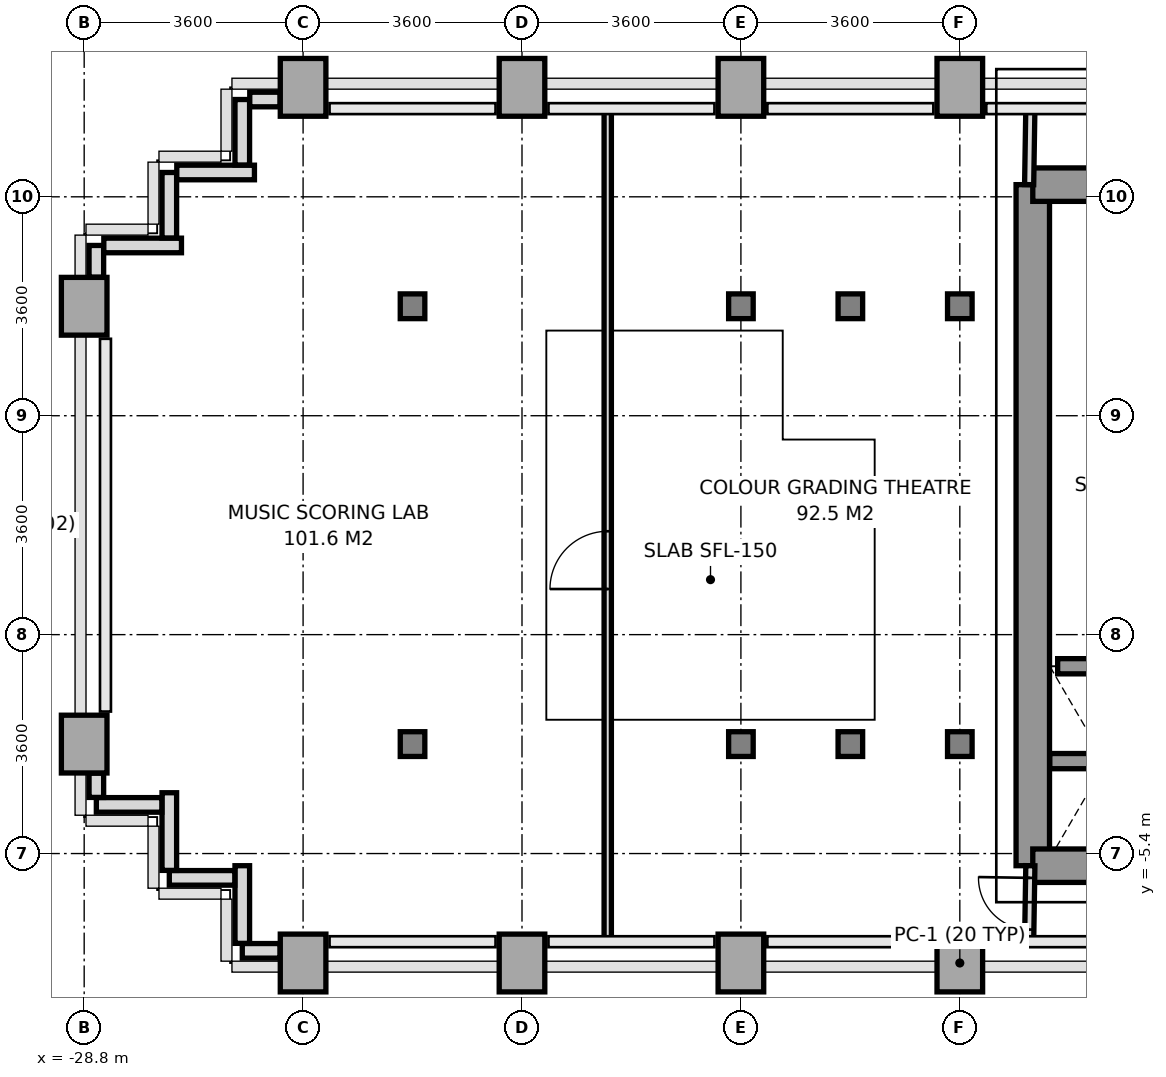
"""IFC4 building model, lengths in metres.
Left out: names, types, materials, properties, quantities, classifications, styles, units other than length and angle.
Written with IfcOpenShell. Run it as: python <this file> out.ifc"""

import sys

from ifc_helpers import new_model, si_unit, direction, frame, frame_2d, origin, origin_2d, place, context, subcontext, project, spatial, rectangle, i_section, extrude, source, transform, mapped, element, fill, save


model = new_model("IFC4")
c1 = context("Model", 3, precision=1e-05, world=origin(), true_north=direction((0.0, 1.0)))
c2 = subcontext(c1, "Body", "Model", "MODEL_VIEW")
j1 = project(units=[si_unit("LENGTHUNIT", "METRE"), si_unit("PLANEANGLEUNIT", "RADIAN")], contexts=[c1])
p1 = place(None, origin())
s1 = spatial("IfcSite", under=j1, at=p1, CompositionType="ELEMENT")
p2 = place(p1, origin())
s2 = spatial("IfcBuilding", under=s1, at=p2, CompositionType="ELEMENT")
p3 = place(p2, frame((0.0, 0.0, 81.6)))
s3 = spatial("IfcBuildingStorey", under=s2, at=p3, CompositionType="ELEMENT", Elevation=81.6)
m1 = source(origin(), c2, "Body", "SweptSolid", [
    extrude(rectangle(XDim=0.75, YDim=0.95, at=origin_2d()), origin(), (0.0, 0.0, 1.0), 3.2),
])
for number, where, z_axis, x_axis in (
    (1, (-28.8, -3.6, 0.0), (0.0, 0.0, 1.0), (1.0, 0.0, 0.0)),
    (2, (-28.8, 3.6, 0.0), (0.0, 0.0, 1.0), (1.0, 0.0, 0.0)),
    (3, (-25.2, -7.2, 0.0), (0.0, 0.0, 1.0), (1.0, 0.0, 0.0)),
    (4, (-25.2, 7.2, 0.0), (0.0, 0.0, 1.0), (1.0, 0.0, 0.0)),
):
    element("IfcColumn", number, at=place(p3, frame(where, z_axis=z_axis, x_axis=x_axis)), inside=s3, PredefinedType="COLUMN", context=c2, shape_type="MappedRepresentation", body=[
        mapped(m1, transform((0.0, 0.0, 0.0), x_axis=(1.0, 0.0, 0.0), y_axis=(0.0, 1.0, 0.0), z_axis=(0.0, 0.0, 1.0), scale=1.0)),
    ])
m2 = source(origin(), c2, "Body", "SweptSolid", [
    extrude(i_section(OverallWidth=0.404, OverallDepth=0.407, WebThickness=0.022, FlangeThickness=0.035, at=origin_2d()), origin(), (0.0, 0.0, 1.0), 3.2),
])
for number, where, z_axis, x_axis in (
    (5, (-23.4, -3.6, 0.0), (0.0, 0.0, 1.0), (1.0, 0.0, 0.0)),
    (6, (-23.4, 3.6, 0.0), (0.0, 0.0, 1.0), (1.0, 0.0, 0.0)),
):
    element("IfcColumn", number, at=place(p3, frame(where, z_axis=z_axis, x_axis=x_axis)), inside=s3, PredefinedType="COLUMN", context=c2, shape_type="MappedRepresentation", body=[
        mapped(m2, transform((0.0, 0.0, 0.0), x_axis=(1.0, 0.0, 0.0), y_axis=(0.0, 1.0, 0.0), z_axis=(0.0, 0.0, 1.0), scale=1.0)),
    ])
for number, where, z_axis, x_axis in (
    (7, (-21.6, -7.2, 0.0), (0.0, 0.0, 1.0), (1.0, 0.0, 0.0)),
    (8, (-21.6, 7.2, 0.0), (0.0, 0.0, 1.0), (1.0, 0.0, 0.0)),
    (9, (-18.0, -7.2, 0.0), (0.0, 0.0, 1.0), (1.0, 0.0, 0.0)),
):
    element("IfcColumn", number, at=place(p3, frame(where, z_axis=z_axis, x_axis=x_axis)), inside=s3, PredefinedType="COLUMN", context=c2, shape_type="MappedRepresentation", body=[
        mapped(m1, transform((0.0, 0.0, 0.0), x_axis=(1.0, 0.0, 0.0), y_axis=(0.0, 1.0, 0.0), z_axis=(0.0, 0.0, 1.0), scale=1.0)),
    ])
for number, where, z_axis, x_axis in (
    (10, (-18.0, -3.6, 0.0), (0.0, 0.0, 1.0), (1.0, 0.0, 0.0)),
    (11, (-18.0, 3.6, 0.0), (0.0, 0.0, 1.0), (1.0, 0.0, 0.0)),
):
    element("IfcColumn", number, at=place(p3, frame(where, z_axis=z_axis, x_axis=x_axis)), inside=s3, PredefinedType="COLUMN", context=c2, shape_type="MappedRepresentation", body=[
        mapped(m2, transform((0.0, 0.0, 0.0), x_axis=(1.0, 0.0, 0.0), y_axis=(0.0, 1.0, 0.0), z_axis=(0.0, 0.0, 1.0), scale=1.0)),
    ])
p4 = place(p3, frame((-18.0, 7.2, 0.0), z_axis=(0.0, 0.0, 1.0), x_axis=(1.0, 0.0, 0.0)))
e12 = element("IfcColumn", 12, at=p4, inside=s3, PredefinedType="COLUMN", context=c2, shape_type="MappedRepresentation", body=[
    mapped(m1, transform((0.0, 0.0, 0.0), x_axis=(1.0, 0.0, 0.0), y_axis=(0.0, 1.0, 0.0), z_axis=(0.0, 0.0, 1.0), scale=1.0)),
])
for number, where, z_axis, x_axis in (
    (13, (-16.2, -3.6, 0.0), (0.0, 0.0, 1.0), (1.0, 0.0, 0.0)),
    (14, (-16.2, 3.6, 0.0), (0.0, 0.0, 1.0), (1.0, 0.0, 0.0)),
):
    element("IfcColumn", number, at=place(p3, frame(where, z_axis=z_axis, x_axis=x_axis)), inside=s3, PredefinedType="COLUMN", context=c2, shape_type="MappedRepresentation", body=[
        mapped(m2, transform((0.0, 0.0, 0.0), x_axis=(1.0, 0.0, 0.0), y_axis=(0.0, 1.0, 0.0), z_axis=(0.0, 0.0, 1.0), scale=1.0)),
    ])
p5 = place(p3, frame((-14.4, -7.2, 0.0), z_axis=(0.0, 0.0, 1.0), x_axis=(1.0, 0.0, 0.0)))
e15 = element("IfcColumn", 15, at=p5, inside=s3, PredefinedType="COLUMN", context=c2, shape_type="MappedRepresentation", body=[
    mapped(m1, transform((0.0, 0.0, 0.0), x_axis=(1.0, 0.0, 0.0), y_axis=(0.0, 1.0, 0.0), z_axis=(0.0, 0.0, 1.0), scale=1.0)),
])
for number, where, z_axis, x_axis in (
    (16, (-14.4, -3.6, 0.0), (0.0, 0.0, 1.0), (1.0, 0.0, 0.0)),
    (17, (-14.4, 3.6, 0.0), (0.0, 0.0, 1.0), (1.0, 0.0, 0.0)),
):
    element("IfcColumn", number, at=place(p3, frame(where, z_axis=z_axis, x_axis=x_axis)), inside=s3, PredefinedType="COLUMN", context=c2, shape_type="MappedRepresentation", body=[
        mapped(m2, transform((0.0, 0.0, 0.0), x_axis=(1.0, 0.0, 0.0), y_axis=(0.0, 1.0, 0.0), z_axis=(0.0, 0.0, 1.0), scale=1.0)),
    ])
p6 = place(p3, frame((-14.4, 7.2, 0.0), z_axis=(0.0, 0.0, 1.0), x_axis=(1.0, 0.0, 0.0)))
e18 = element("IfcColumn", 18, at=p6, inside=s3, PredefinedType="COLUMN", context=c2, shape_type="MappedRepresentation", body=[
    mapped(m1, transform((0.0, 0.0, 0.0), x_axis=(1.0, 0.0, 0.0), y_axis=(0.0, 1.0, 0.0), z_axis=(0.0, 0.0, 1.0), scale=1.0)),
])
p7 = place(p3, frame((-25.578, -7.0, 0.0), z_axis=(0.0, 0.0, 1.0), x_axis=(-1.0, 0.0, 0.0)))
e19 = element("IfcWall", 19, at=p7, inside=s3, PredefinedType="PARAPET", context=c2, shape_type="SweptSolid", body=[
    extrude(rectangle(XDim=0.622, YDim=0.24, at=frame_2d((0.311, 0.0))), origin(), (0.0, 0.0, 1.0), 1.15),
])
p8 = place(p3, frame((-26.2, -6.877, 0.0), z_axis=(0.0, 0.0, 1.0), x_axis=(0.0, 1.0, 0.0)))
e20 = element("IfcWall", 20, at=p8, inside=s3, PredefinedType="PARAPET", context=c2, shape_type="SweptSolid", body=[
    extrude(rectangle(XDim=1.277, YDim=0.24, at=frame_2d((0.638, 0.0))), origin(), (0.0, 0.0, 1.0), 1.15),
])
p9 = place(p3, frame((-26.323, -5.8, 0.0), z_axis=(0.0, 0.0, 1.0), x_axis=(-1.0, 0.0, 0.0)))
e21 = element("IfcWall", 21, at=p9, inside=s3, PredefinedType="PARAPET", context=c2, shape_type="SweptSolid", body=[
    extrude(rectangle(XDim=1.077, YDim=0.24, at=frame_2d((0.539, 0.0))), origin(), (0.0, 0.0, 1.0), 1.15),
])
p10 = place(p3, frame((-27.4, -5.677, 0.0), z_axis=(0.0, 0.0, 1.0), x_axis=(0.0, 1.0, 0.0)))
e22 = element("IfcWall", 22, at=p10, inside=s3, PredefinedType="PARAPET", context=c2, shape_type="SweptSolid", body=[
    extrude(rectangle(XDim=1.277, YDim=0.24, at=frame_2d((0.639, 0.0))), origin(), (0.0, 0.0, 1.0), 1.15),
])
p11 = place(p3, frame((-27.523, -4.6, 0.0), z_axis=(0.0, 0.0, 1.0), x_axis=(-1.0, 0.0, 0.0)))
e23 = element("IfcWall", 23, at=p11, inside=s3, PredefinedType="PARAPET", context=c2, shape_type="SweptSolid", body=[
    extrude(rectangle(XDim=1.077, YDim=0.24, at=frame_2d((0.539, 0.0))), origin(), (0.0, 0.0, 1.0), 1.15),
])
p12 = place(p3, frame((-28.6, -4.477, 0.0), z_axis=(0.0, 0.0, 1.0), x_axis=(0.0, 1.0, 0.0)))
e24 = element("IfcWall", 24, at=p12, inside=s3, PredefinedType="PARAPET", context=c2, shape_type="SweptSolid", body=[
    extrude(rectangle(XDim=0.399, YDim=0.24, at=frame_2d((0.2, 0.0))), origin(), (0.0, 0.0, 1.0), 1.15),
])
p13 = place(p3, frame((-28.6, 4.078, 0.0), z_axis=(0.0, 0.0, 1.0), x_axis=(0.0, 1.0, 0.0)))
e25 = element("IfcWall", 25, at=p13, inside=s3, PredefinedType="PARAPET", context=c2, shape_type="SweptSolid", body=[
    extrude(rectangle(XDim=0.522, YDim=0.24, at=frame_2d((0.261, 0.0))), origin(), (0.0, 0.0, 1.0), 1.15),
])
p14 = place(p3, frame((-28.477, 4.6, 0.0), z_axis=(0.0, 0.0, 1.0), x_axis=(1.0, 0.0, 0.0)))
e26 = element("IfcWall", 26, at=p14, inside=s3, PredefinedType="PARAPET", context=c2, shape_type="SweptSolid", body=[
    extrude(rectangle(XDim=1.277, YDim=0.24, at=frame_2d((0.639, 0.0))), origin(), (0.0, 0.0, 1.0), 1.15),
])
p15 = place(p3, frame((-27.4, 4.723, 0.0), z_axis=(0.0, 0.0, 1.0), x_axis=(0.0, 1.0, 0.0)))
e27 = element("IfcWall", 27, at=p15, inside=s3, PredefinedType="PARAPET", context=c2, shape_type="SweptSolid", body=[
    extrude(rectangle(XDim=1.077, YDim=0.24, at=frame_2d((0.539, 0.0))), origin(), (0.0, 0.0, 1.0), 1.15),
])
p16 = place(p3, frame((-27.277, 5.8, 0.0), z_axis=(0.0, 0.0, 1.0), x_axis=(1.0, 0.0, 0.0)))
e28 = element("IfcWall", 28, at=p16, inside=s3, PredefinedType="PARAPET", context=c2, shape_type="SweptSolid", body=[
    extrude(rectangle(XDim=1.277, YDim=0.24, at=frame_2d((0.639, 0.0))), origin(), (0.0, 0.0, 1.0), 1.15),
])
p17 = place(p3, frame((-26.2, 5.923, 0.0), z_axis=(0.0, 0.0, 1.0), x_axis=(0.0, 1.0, 0.0)))
e29 = element("IfcWall", 29, at=p17, inside=s3, PredefinedType="PARAPET", context=c2, shape_type="SweptSolid", body=[
    extrude(rectangle(XDim=1.077, YDim=0.24, at=frame_2d((0.539, 0.0))), origin(), (0.0, 0.0, 1.0), 1.15),
])
p18 = place(p3, frame((-26.077, 7.0, 0.0), z_axis=(0.0, 0.0, 1.0), x_axis=(1.0, 0.0, 0.0)))
e30 = element("IfcWall", 30, at=p18, inside=s3, PredefinedType="PARAPET", context=c2, shape_type="SweptSolid", body=[
    extrude(rectangle(XDim=0.499, YDim=0.24, at=frame_2d((0.25, 0.0))), origin(), (0.0, 0.0, 1.0), 1.15),
])
p19 = place(p3, frame((-13.2, -5.6, 0.0), z_axis=(0.0, 0.0, 1.0), x_axis=(0.0, 1.0, 0.0)))
e31 = element("IfcWall", 31, at=p19, inside=s3, PredefinedType="SHEAR", context=c2, shape_type="SweptSolid", body=[
    extrude(rectangle(XDim=11.2, YDim=0.55, at=frame_2d((5.6, 0.0))), origin(), (0.0, 0.0, 1.0), 3.2),
])
p20 = place(p3, frame((-13.2, 5.6, 0.0), z_axis=(0.0, 0.0, 1.0), x_axis=(1.0, 0.0, 0.0)))
e32 = element("IfcWall", 32, at=p20, inside=s3, PredefinedType="SHEAR", context=c2, shape_type="SweptSolid", body=[
    extrude(rectangle(XDim=1.819, YDim=0.55, at=frame_2d((0.909, 0.0))), origin(), (0.0, 0.0, 1.0), 3.2),
])
p21 = place(p3, frame((-13.2, -5.6, 0.0), z_axis=(0.0, 0.0, 1.0), x_axis=(1.0, 0.0, 0.0)))
e33 = element("IfcWall", 33, at=p21, inside=s3, PredefinedType="SHEAR", context=c2, shape_type="SweptSolid", body=[
    extrude(rectangle(XDim=7.8, YDim=0.55, at=frame_2d((3.9, 0.0))), origin(), (0.0, 0.0, 1.0), 3.2),
])
p22 = place(p21, frame((3.6, 0.0, 0.0)))
e34 = element("IfcOpeningElement", 34, at=p22, cuts=e33, PredefinedType="OPENING", context=c2, shape_type="SweptSolid", body=[
    extrude(rectangle(XDim=1.2, YDim=2.2, at=frame_2d((0.6, 1.1))), frame((0.0, 0.285, 0.0), z_axis=(0.0, -1.0, 0.0), x_axis=(1.0, 0.0, 0.0)), (0.0, 0.0, 1.0), 0.57),
])
p23 = place(p3, frame((-12.92, -3.88, 0.0), z_axis=(0.0, 0.0, 1.0), x_axis=(1.0, 0.0, 0.0)))
e35 = element("IfcWall", 35, at=p23, inside=s3, PredefinedType="SOLIDWALL", context=c2, shape_type="SweptSolid", body=[
    extrude(rectangle(XDim=1.84, YDim=0.25, at=frame_2d((0.92, 0.0))), origin(), (0.0, 0.0, 1.0), 3.2),
])
p24 = place(p3, frame((-12.791, -2.32, 0.0), z_axis=(0.0, 0.0, 1.0), x_axis=(1.0, 0.0, 0.0)))
e36 = element("IfcWall", 36, at=p24, inside=s3, PredefinedType="SOLIDWALL", context=c2, shape_type="SweptSolid", body=[
    extrude(rectangle(XDim=1.582, YDim=0.25, at=frame_2d((0.791, 0.0))), origin(), (0.0, 0.0, 1.0), 3.2),
])
p25 = place(p3, frame((-13.26, 5.6, 0.0), z_axis=(0.0, 0.0, 1.0), x_axis=(0.016013571389, 0.999871774545, 0.0)))
e37 = element("IfcWall", 37, at=p25, inside=s3, PredefinedType="PARTITIONING", context=c2, shape_type="SweptSolid", body=[
    extrude(rectangle(XDim=1.25, YDim=0.15, at=frame_2d((0.625, 0.0))), origin(), (0.0, 0.0, 1.0), 3.2),
])
p26 = place(p3, frame((-13.26, -6.85, 0.0), z_axis=(0.0, 0.0, 1.0), x_axis=(0.016013571389, 0.999871774545, 0.0)))
e38 = element("IfcWall", 38, at=p26, inside=s3, PredefinedType="PARTITIONING", context=c2, shape_type="SweptSolid", body=[
    extrude(rectangle(XDim=1.25, YDim=0.15, at=frame_2d((0.625, 0.0))), origin(), (0.0, 0.0, 1.0), 3.2),
])
p27 = place(p26, frame((0.2, 0.0, 0.0)))
e39 = element("IfcOpeningElement", 39, at=p27, cuts=e38, PredefinedType="OPENING", context=c2, shape_type="SweptSolid", body=[
    extrude(rectangle(XDim=0.85, YDim=2.1, at=frame_2d((0.425, 1.05))), frame((0.0, 0.085, 0.0), z_axis=(0.0, -1.0, 0.0), x_axis=(1.0, 0.0, 0.0)), (0.0, 0.0, 1.0), 0.17),
])
p28 = place(p3, frame((-20.19, -6.85, 0.0), z_axis=(0.0, 0.0, 1.0), x_axis=(0.0, 1.0, 0.0)))
e40 = element("IfcWall", 40, at=p28, inside=s3, PredefinedType="PARTITIONING", context=c2, shape_type="SweptSolid", body=[
    extrude(rectangle(XDim=13.7, YDim=0.12, at=frame_2d((6.85, 0.0))), origin(), (0.0, 0.0, 1.0), 2.71),
])
p29 = place(p28, frame((5.8, 0.0, 0.0)))
e41 = element("IfcOpeningElement", 41, at=p29, cuts=e40, PredefinedType="OPENING", context=c2, shape_type="SweptSolid", body=[
    extrude(rectangle(XDim=0.95, YDim=2.15, at=frame_2d((0.475, 1.075))), frame((0.0, 0.07, 0.0), z_axis=(0.0, -1.0, 0.0), x_axis=(1.0, 0.0, 0.0)), (0.0, 0.0, 1.0), 0.14),
])
m3 = source(origin(), c2, "Body", "SweptSolid", [
    extrude(rectangle(XDim=0.85, YDim=2.1, at=frame_2d((0.425, 1.05))), frame((0.0, 0.025, 0.0), z_axis=(0.0, -1.0, 0.0), x_axis=(1.0, 0.0, 0.0)), (0.0, 0.0, 1.0), 0.05),
])
p30 = place(p27, origin())
e42 = element("IfcDoor", 42, at=p30, inside=s3, OperationType="SINGLE_SWING_RIGHT", PredefinedType="DOOR", context=c2, shape_type="MappedRepresentation", body=[
    mapped(m3, transform((0.0, 0.0, 0.0), x_axis=(1.0, 0.0, 0.0), y_axis=(0.0, 1.0, 0.0), z_axis=(0.0, 0.0, 1.0), scale=1.0)),
])
fill(e39, e42)
m4 = source(origin(), c2, "Body", "SweptSolid", [
    extrude(rectangle(XDim=0.95, YDim=2.15, at=frame_2d((0.475, 1.075))), frame((0.0, 0.025, 0.0), z_axis=(0.0, -1.0, 0.0), x_axis=(1.0, 0.0, 0.0)), (0.0, 0.0, 1.0), 0.05),
])
p31 = place(p29, origin())
e43 = element("IfcDoor", 43, at=p31, inside=s3, OperationType="SINGLE_SWING_LEFT", PredefinedType="DOOR", context=c2, shape_type="MappedRepresentation", body=[
    mapped(m4, transform((0.0, 0.0, 0.0), x_axis=(1.0, 0.0, 0.0), y_axis=(0.0, 1.0, 0.0), z_axis=(0.0, 0.0, 1.0), scale=1.0)),
])
fill(e41, e43)
save(model, sys.argv[1])
